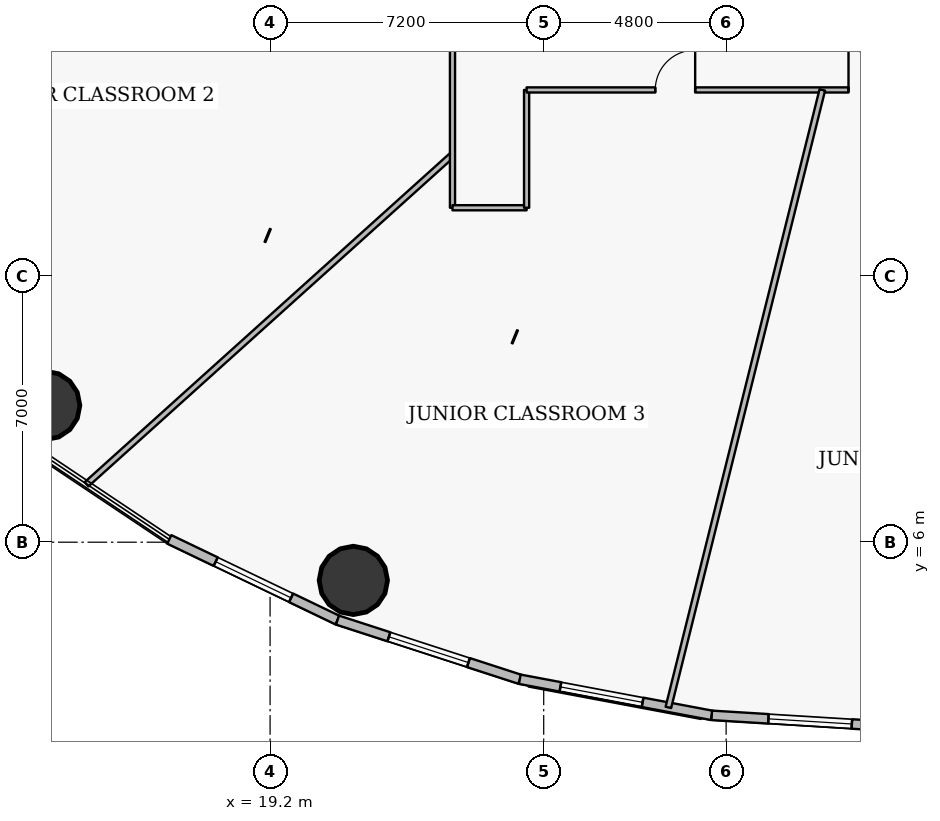
"""IFC4 building model, lengths in metres.
Left out: names, types, materials, properties, quantities, classifications, styles, units other than length and angle.
Written with IfcOpenShell. Run it as: python <this file> out.ifc"""

import sys

from ifc_helpers import new_model, si_unit, direction, frame, frame_2d, origin, origin_2d, place, context, subcontext, project, spatial, rectangle, hollow_circle, extrude, source, transform, mapped, element, fill, save


model = new_model("IFC4")
c1 = context("Model", 3, precision=1e-05, world=origin(), true_north=direction((0.0, 1.0)))
c2 = subcontext(c1, "Body", "Model", "MODEL_VIEW")
j1 = project(units=[si_unit("LENGTHUNIT", "METRE"), si_unit("PLANEANGLEUNIT", "RADIAN")], contexts=[c1])
p1 = place(None, origin())
s1 = spatial("IfcSite", under=j1, at=p1, CompositionType="ELEMENT")
p2 = place(p1, origin())
s2 = spatial("IfcBuilding", under=s1, at=p2, CompositionType="ELEMENT")
p3 = place(p2, frame((0.0, 0.0, 6.0)))
s3 = spatial("IfcBuildingStorey", under=s2, at=p3, CompositionType="ELEMENT", Elevation=6.0)
for number, where, z_axis, x_axis in (
    (1, (13.295, 9.599, 0.0), (0.0, 0.0, 1.0), (1.0, 0.0, 0.0)),
    (2, (21.391, 4.995, 0.0), (0.0, 0.0, 1.0), (1.0, 0.0, 0.0)),
):
    element("IfcColumn", number, at=place(p3, frame(where, z_axis=z_axis, x_axis=x_axis)), inside=s3, PredefinedType="COLUMN", context=c2, shape_type="SweptSolid", body=[
        extrude(hollow_circle(Radius=0.9, WallThickness=0.05, at=origin_2d()), origin(), (0.0, 0.0, 1.0), 4.2),
    ])
p4 = place(p3, frame((20.974, 3.95, 0.0), z_axis=(0.0, 0.0, 1.0), x_axis=(-0.901559523397, 0.432655088692, 0.0)))
e3 = element("IfcWall", 3, at=p4, inside=s3, PredefinedType="SOLIDWALL", context=c2, shape_type="SweptSolid", body=[
    extrude(rectangle(XDim=4.91, YDim=0.25, at=frame_2d((2.455, 0.0))), origin(), (0.0, 0.0, 1.0), 3.9),
])
p5 = place(p4, frame((1.355, 0.0, 0.9)))
e4 = element("IfcOpeningElement", 4, at=p5, cuts=e3, PredefinedType="OPENING", context=c2, shape_type="SweptSolid", body=[
    extrude(rectangle(XDim=2.2, YDim=2.0, at=origin_2d()), frame((1.1, 0.135, 1.0), z_axis=(0.0, -1.0, 0.0), x_axis=(1.0, 0.0, 0.0)), (0.0, 0.0, 1.0), 0.27),
])
p6 = place(p3, frame((25.771, 2.394, 0.0), z_axis=(0.0, 0.0, 1.0), x_axis=(-0.951198629726, 0.308579271513, 0.0)))
e5 = element("IfcWall", 5, at=p6, inside=s3, PredefinedType="SOLIDWALL", context=c2, shape_type="SweptSolid", body=[
    extrude(rectangle(XDim=5.044, YDim=0.25, at=frame_2d((2.522, 0.0))), origin(), (0.0, 0.0, 1.0), 3.9),
])
p7 = place(p6, frame((1.422, 0.0, 0.9)))
e6 = element("IfcOpeningElement", 6, at=p7, cuts=e5, PredefinedType="OPENING", context=c2, shape_type="SweptSolid", body=[
    extrude(rectangle(XDim=2.2, YDim=2.0, at=origin_2d()), frame((1.1, 0.135, 1.0), z_axis=(0.0, -1.0, 0.0), x_axis=(1.0, 0.0, 0.0)), (0.0, 0.0, 1.0), 0.27),
])
p8 = place(p3, frame((30.822, 1.444, 0.0), z_axis=(0.0, 0.0, 1.0), x_axis=(-0.98278278947, 0.184764684726, 0.0)))
e7 = element("IfcWall", 7, at=p8, inside=s3, PredefinedType="SOLIDWALL", context=c2, shape_type="SweptSolid", body=[
    extrude(rectangle(XDim=5.139, YDim=0.25, at=frame_2d((2.569, 0.0))), origin(), (0.0, 0.0, 1.0), 3.9),
])
p9 = place(p8, frame((1.852, 0.0, 0.9)))
e8 = element("IfcOpeningElement", 8, at=p9, cuts=e7, PredefinedType="OPENING", context=c2, shape_type="SweptSolid", body=[
    extrude(rectangle(XDim=2.2, YDim=2.0, at=origin_2d()), frame((1.1, 0.135, 1.0), z_axis=(0.0, -1.0, 0.0), x_axis=(1.0, 0.0, 0.0)), (0.0, 0.0, 1.0), 0.27),
])
p10 = place(p3, frame((36.0, 1.125, 0.0), z_axis=(0.0, 0.0, 1.0), x_axis=(-0.998106762298, 0.061505211614, 0.0)))
e9 = element("IfcWall", 9, at=p10, inside=s3, PredefinedType="SOLIDWALL", context=c2, shape_type="SweptSolid", body=[
    extrude(rectangle(XDim=5.188, YDim=0.25, at=frame_2d((2.594, 0.0))), origin(), (0.0, 0.0, 1.0), 3.9),
])
p11 = place(p10, frame((1.494, 0.0, 0.9)))
e10 = element("IfcOpeningElement", 10, at=p11, cuts=e9, PredefinedType="OPENING", context=c2, shape_type="SweptSolid", body=[
    extrude(rectangle(XDim=2.2, YDim=2.0, at=origin_2d()), frame((1.1, 0.135, 1.0), z_axis=(0.0, -1.0, 0.0), x_axis=(1.0, 0.0, 0.0)), (0.0, 0.0, 1.0), 0.27),
])
p12 = place(p3, frame((14.37, 7.524, 0.0), z_axis=(0.0, 0.0, 1.0), x_axis=(0.743149857609, 0.669125017569, 0.0)))
e11 = element("IfcWall", 11, at=p12, inside=s3, PredefinedType="PARTITIONING", context=c2, shape_type="SweptSolid", body=[
    extrude(rectangle(XDim=12.958, YDim=0.15, at=frame_2d((6.479, 0.0))), origin(), (0.0, 0.0, 1.0), 3.285),
])
p13 = place(p3, frame((24.0, 14.8, 0.0), z_axis=(0.0, 0.0, 1.0), x_axis=(0.0, 1.0, 0.0)))
e12 = element("IfcWall", 12, at=p13, inside=s3, PredefinedType="PARTITIONING", context=c2, shape_type="SweptSolid", body=[
    extrude(rectangle(XDim=12.78, YDim=0.135, at=frame_2d((6.39, 0.0))), origin(), (0.0, 0.0, 1.0), 3.085),
])
p14 = place(p13, frame((5.748, 0.0, 0.0)))
e13 = element("IfcOpeningElement", 13, at=p14, cuts=e12, PredefinedType="OPENING", context=c2, shape_type="SweptSolid", body=[
    extrude(rectangle(XDim=1.05, YDim=2.15, at=origin_2d()), frame((0.525, 0.078, 1.075), z_axis=(0.0, -1.0, 0.0), x_axis=(1.0, 0.0, 0.0)), (0.0, 0.0, 1.0), 0.155),
])
p15 = place(p3, frame((24.0, 14.8, 0.0), z_axis=(0.0, 0.0, 1.0), x_axis=(1.0, 0.0, 0.0)))
e14 = element("IfcWall", 14, at=p15, inside=s3, PredefinedType="PARTITIONING", context=c2, shape_type="SweptSolid", body=[
    extrude(rectangle(XDim=1.95, YDim=0.135, at=frame_2d((0.975, 0.0))), origin(), (0.0, 0.0, 1.0), 3.9),
])
p16 = place(p3, frame((25.95, 14.8, 0.0), z_axis=(0.0, 0.0, 1.0), x_axis=(0.0, 1.0, 0.0)))
e15 = element("IfcWall", 15, at=p16, inside=s3, PredefinedType="PARTITIONING", context=c2, shape_type="SweptSolid", body=[
    extrude(rectangle(XDim=3.1, YDim=0.135, at=frame_2d((1.55, 0.0))), origin(), (0.0, 0.0, 1.0), 3.9),
])
p17 = place(p3, frame((25.95, 17.9, 0.0), z_axis=(0.0, 0.0, 1.0), x_axis=(1.0, 0.0, 0.0)))
e16 = element("IfcWall", 16, at=p17, inside=s3, PredefinedType="PARTITIONING", context=c2, shape_type="SweptSolid", body=[
    extrude(rectangle(XDim=10.25, YDim=0.135, at=frame_2d((5.125, 0.0))), origin(), (0.0, 0.0, 1.0), 3.085),
])
p18 = place(p17, frame((3.385, 0.0, 0.0)))
e17 = element("IfcOpeningElement", 17, at=p18, cuts=e16, PredefinedType="OPENING", context=c2, shape_type="SweptSolid", body=[
    extrude(rectangle(XDim=1.05, YDim=2.15, at=origin_2d()), frame((0.525, 0.078, 1.075), z_axis=(0.0, -1.0, 0.0), x_axis=(1.0, 0.0, 0.0)), (0.0, 0.0, 1.0), 0.155),
])
p19 = place(p17, frame((8.471, 0.0, 0.0)))
e18 = element("IfcOpeningElement", 18, at=p19, cuts=e16, PredefinedType="OPENING", context=c2, shape_type="SweptSolid", body=[
    extrude(rectangle(XDim=1.05, YDim=2.15, at=origin_2d()), frame((0.525, 0.078, 1.075), z_axis=(0.0, -1.0, 0.0), x_axis=(1.0, 0.0, 0.0)), (0.0, 0.0, 1.0), 0.155),
])
p20 = place(p3, frame((29.68, 1.654, 0.0), z_axis=(0.0, 0.0, 1.0), x_axis=(0.241928320832, 0.970294124263, 0.0)))
e19 = element("IfcWall", 19, at=p20, inside=s3, PredefinedType="PARTITIONING", context=c2, shape_type="SweptSolid", body=[
    extrude(rectangle(XDim=16.744, YDim=0.15, at=frame_2d((8.372, 0.0))), origin(), (0.0, 0.0, 1.0), 3.285),
])
m1 = source(origin(), c2, "Body", "SweptSolid", [
    extrude(rectangle(XDim=2.2, YDim=2.0, at=origin_2d()), frame((1.1, 0.03, 1.0), z_axis=(0.0, -1.0, 0.0), x_axis=(1.0, 0.0, 0.0)), (0.0, 0.0, 1.0), 0.06),
])
p21 = place(p5, origin())
e20 = element("IfcWindow", 20, at=p21, inside=s3, PartitioningType="TRIPLE_PANEL_VERTICAL", PredefinedType="WINDOW", context=c2, shape_type="MappedRepresentation", body=[
    mapped(m1, transform((0.0, 0.0, 0.0), x_axis=(1.0, 0.0, 0.0), y_axis=(0.0, 1.0, 0.0), z_axis=(0.0, 0.0, 1.0), scale=1.0)),
])
fill(e4, e20)
p22 = place(p7, origin())
e21 = element("IfcWindow", 21, at=p22, inside=s3, PartitioningType="TRIPLE_PANEL_VERTICAL", PredefinedType="WINDOW", context=c2, shape_type="MappedRepresentation", body=[
    mapped(m1, transform((0.0, 0.0, 0.0), x_axis=(1.0, 0.0, 0.0), y_axis=(0.0, 1.0, 0.0), z_axis=(0.0, 0.0, 1.0), scale=1.0)),
])
fill(e6, e21)
p23 = place(p9, origin())
e22 = element("IfcWindow", 22, at=p23, inside=s3, PartitioningType="TRIPLE_PANEL_VERTICAL", PredefinedType="WINDOW", context=c2, shape_type="MappedRepresentation", body=[
    mapped(m1, transform((0.0, 0.0, 0.0), x_axis=(1.0, 0.0, 0.0), y_axis=(0.0, 1.0, 0.0), z_axis=(0.0, 0.0, 1.0), scale=1.0)),
])
fill(e8, e22)
p24 = place(p11, origin())
e23 = element("IfcWindow", 23, at=p24, inside=s3, PartitioningType="TRIPLE_PANEL_VERTICAL", PredefinedType="WINDOW", context=c2, shape_type="MappedRepresentation", body=[
    mapped(m1, transform((0.0, 0.0, 0.0), x_axis=(1.0, 0.0, 0.0), y_axis=(0.0, 1.0, 0.0), z_axis=(0.0, 0.0, 1.0), scale=1.0)),
])
fill(e10, e23)
m2 = source(origin(), c2, "Body", "SweptSolid", [
    extrude(rectangle(XDim=1.05, YDim=2.15, at=origin_2d()), frame((0.525, 0.025, 1.075), z_axis=(0.0, -1.0, 0.0), x_axis=(1.0, 0.0, 0.0)), (0.0, 0.0, 1.0), 0.05),
])
p25 = place(p18, origin())
e24 = element("IfcDoor", 24, at=p25, inside=s3, OperationType="SINGLE_SWING_RIGHT", PredefinedType="DOOR", context=c2, shape_type="MappedRepresentation", body=[
    mapped(m2, transform((0.0, 0.0, 0.0), x_axis=(1.0, 0.0, 0.0), y_axis=(0.0, 1.0, 0.0), z_axis=(0.0, 0.0, 1.0), scale=1.0)),
])
fill(e17, e24)
p26 = place(p19, origin())
e25 = element("IfcDoor", 25, at=p26, inside=s3, OperationType="SINGLE_SWING_LEFT", PredefinedType="DOOR", context=c2, shape_type="MappedRepresentation", body=[
    mapped(m2, transform((0.0, 0.0, 0.0), x_axis=(1.0, 0.0, 0.0), y_axis=(0.0, 1.0, 0.0), z_axis=(0.0, 0.0, 1.0), scale=1.0)),
])
fill(e18, e25)
save(model, sys.argv[1])
